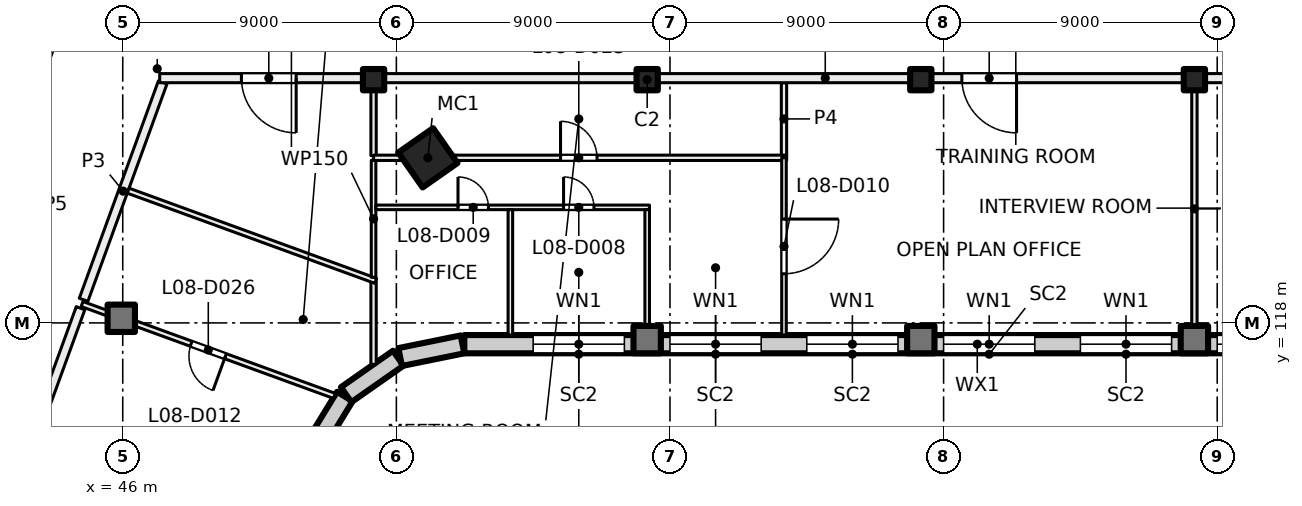
"""IFC4 building model, lengths in metres.
Left out: names, types, materials, properties, quantities, classifications, styles, units other than length and angle.
Written with IfcOpenShell. Run it as: python <this file> out.ifc"""

import sys

from ifc_helpers import new_model, si_unit, direction, frame, frame_2d, origin, origin_2d, place, context, subcontext, project, spatial, rectangle, hollow_rectangle, extrude, element, fill, save


model = new_model("IFC4")
c1 = context("Model", 3, precision=1e-05, world=origin(), true_north=direction((0.0, 1.0)))
c2 = subcontext(c1, "Body", "Model", "MODEL_VIEW")
j1 = project(units=[si_unit("LENGTHUNIT", "METRE"), si_unit("PLANEANGLEUNIT", "RADIAN")], contexts=[c1])
p1 = place(None, origin())
s1 = spatial("IfcSite", under=j1, at=p1, CompositionType="ELEMENT")
p2 = place(p1, origin())
s2 = spatial("IfcBuilding", under=s1, at=p2, CompositionType="ELEMENT")
p3 = place(p2, frame((0.0, 0.0, 39.5)))
s3 = spatial("IfcBuildingStorey", under=s2, at=p3, CompositionType="ELEMENT", Elevation=39.5)
p4 = place(p3, frame((56.036, 123.43, 0.0), z_axis=(0.0, 0.0, 1.0), x_axis=(0.573576436351, -0.819152044289, 0.0)))
e1 = element("IfcColumn", 1, at=p4, inside=s3, PredefinedType="COLUMN", context=c2, shape_type="SweptSolid", body=[
    extrude(hollow_rectangle(XDim=1.4, YDim=1.4, WallThickness=0.04, at=origin_2d()), origin(), (0.0, 0.0, 1.0), 4.0),
])
for number, where, z_axis, x_axis in (
    (2, (54.25, 126.0, 0.0), (0.0, 0.0, 1.0), (1.0, 0.0, 0.0)),
    (3, (63.25, 126.0, 0.0), (0.0, 0.0, 1.0), (1.0, 0.0, 0.0)),
    (4, (72.25, 126.0, 0.0), (0.0, 0.0, 1.0), (1.0, 0.0, 0.0)),
    (5, (81.25, 126.0, 0.0), (0.0, 0.0, 1.0), (1.0, 0.0, 0.0)),
):
    element("IfcColumn", number, at=place(p3, frame(where, z_axis=z_axis, x_axis=x_axis)), inside=s3, PredefinedType="COLUMN", context=c2, shape_type="SweptSolid", body=[
        extrude(rectangle(XDim=0.7, YDim=0.7, at=origin_2d()), origin(), (0.0, 0.0, 1.0), 4.0),
    ])
for number, where, z_axis, x_axis in (
    (6, (45.952, 118.152, 0.0), (0.0, 0.0, 1.0), (1.0, 0.0, 0.0)),
    (7, (63.25, 117.45, 0.0), (0.0, 0.0, 1.0), (1.0, 0.0, 0.0)),
    (8, (72.25, 117.45, 0.0), (0.0, 0.0, 1.0), (1.0, 0.0, 0.0)),
    (9, (81.25, 117.45, 0.0), (0.0, 0.0, 1.0), (1.0, 0.0, 0.0)),
):
    element("IfcColumn", number, at=place(p3, frame(where, z_axis=z_axis, x_axis=x_axis)), inside=s3, PredefinedType="COLUMN", context=c2, shape_type="SweptSolid", body=[
        extrude(rectangle(XDim=0.9, YDim=0.9, at=origin_2d()), origin(), (0.0, 0.0, 1.0), 4.0),
    ])
p5 = place(p3, frame((53.305, 115.578, 0.0), z_axis=(0.0, 0.0, 1.0), x_axis=(-0.522402266438, -0.852699168535, 0.0)))
e10 = element("IfcWall", 10, at=p5, inside=s3, PredefinedType="SOLIDWALL", context=c2, shape_type="SweptSolid", body=[
    extrude(rectangle(XDim=2.042, YDim=0.6, at=frame_2d((1.021, 0.0))), origin(), (0.0, 0.0, 1.0), 3.625),
])
for number, where, z_axis, x_axis in (
    (11, (55.062, 116.839, 0.0), (0.0, 0.0, 1.0), (-0.819, -0.574, 0.0)),
    (12, (57.175, 117.294, 0.0), (0.0, 0.0, 1.0), (-0.98, -0.199, 0.0)),
):
    element("IfcWall", number, at=place(p3, frame(where, z_axis=z_axis, x_axis=x_axis)), inside=s3, PredefinedType="SOLIDWALL", context=c2, shape_type="SweptSolid", body=[
        extrude(rectangle(XDim=2.092, YDim=0.6, at=frame_2d((1.046, 0.0))), origin(), (0.0, 0.0, 1.0), 3.625),
    ])
p6 = place(p3, frame((90.98, 117.3, 0.0), z_axis=(0.0, 0.0, 1.0), x_axis=(-1.0, 0.0, 0.0)))
e13 = element("IfcWall", 13, at=p6, inside=s3, PredefinedType="SOLIDWALL", context=c2, shape_type="SweptSolid", body=[
    extrude(rectangle(XDim=33.745, YDim=0.6, at=frame_2d((16.873, 0.0))), origin(), (0.0, 0.0, 1.0), 3.625),
])
p7 = place(p6, frame((1.48, 0.0, 0.9)))
e14 = element("IfcOpeningElement", 14, at=p7, cuts=e13, PredefinedType="OPENING", context=c2, shape_type="SweptSolid", body=[
    extrude(rectangle(XDim=3.0, YDim=2.4, at=frame_2d((1.5, 1.2))), frame((0.0, 0.31, 0.0), z_axis=(0.0, -1.0, 0.0), x_axis=(1.0, 0.0, 0.0)), (0.0, 0.0, 1.0), 0.62),
])
p8 = place(p6, frame((5.98, 0.0, 0.9)))
e15 = element("IfcOpeningElement", 15, at=p8, cuts=e13, PredefinedType="OPENING", context=c2, shape_type="SweptSolid", body=[
    extrude(rectangle(XDim=3.0, YDim=2.4, at=frame_2d((1.5, 1.2))), frame((0.0, 0.31, 0.0), z_axis=(0.0, -1.0, 0.0), x_axis=(1.0, 0.0, 0.0)), (0.0, 0.0, 1.0), 0.62),
])
p9 = place(p6, frame((10.48, 0.0, 0.9)))
e16 = element("IfcOpeningElement", 16, at=p9, cuts=e13, PredefinedType="OPENING", context=c2, shape_type="SweptSolid", body=[
    extrude(rectangle(XDim=3.0, YDim=2.4, at=frame_2d((1.5, 1.2))), frame((0.0, 0.31, 0.0), z_axis=(0.0, -1.0, 0.0), x_axis=(1.0, 0.0, 0.0)), (0.0, 0.0, 1.0), 0.62),
])
p10 = place(p6, frame((14.98, 0.0, 0.9)))
e17 = element("IfcOpeningElement", 17, at=p10, cuts=e13, PredefinedType="OPENING", context=c2, shape_type="SweptSolid", body=[
    extrude(rectangle(XDim=3.0, YDim=2.4, at=frame_2d((1.5, 1.2))), frame((0.0, 0.31, 0.0), z_axis=(0.0, -1.0, 0.0), x_axis=(1.0, 0.0, 0.0)), (0.0, 0.0, 1.0), 0.62),
])
p11 = place(p6, frame((19.48, 0.0, 0.9)))
e18 = element("IfcOpeningElement", 18, at=p11, cuts=e13, PredefinedType="OPENING", context=c2, shape_type="SweptSolid", body=[
    extrude(rectangle(XDim=3.0, YDim=2.4, at=frame_2d((1.5, 1.2))), frame((0.0, 0.31, 0.0), z_axis=(0.0, -1.0, 0.0), x_axis=(1.0, 0.0, 0.0)), (0.0, 0.0, 1.0), 0.62),
])
p12 = place(p6, frame((23.98, 0.0, 0.9)))
e19 = element("IfcOpeningElement", 19, at=p12, cuts=e13, PredefinedType="OPENING", context=c2, shape_type="SweptSolid", body=[
    extrude(rectangle(XDim=3.0, YDim=2.4, at=frame_2d((1.5, 1.2))), frame((0.0, 0.31, 0.0), z_axis=(0.0, -1.0, 0.0), x_axis=(1.0, 0.0, 0.0)), (0.0, 0.0, 1.0), 0.62),
])
p13 = place(p6, frame((28.48, 0.0, 0.9)))
e20 = element("IfcOpeningElement", 20, at=p13, cuts=e13, PredefinedType="OPENING", context=c2, shape_type="SweptSolid", body=[
    extrude(rectangle(XDim=3.0, YDim=2.4, at=frame_2d((1.5, 1.2))), frame((0.0, 0.31, 0.0), z_axis=(0.0, -1.0, 0.0), x_axis=(1.0, 0.0, 0.0)), (0.0, 0.0, 1.0), 0.62),
])
p14 = place(p3, frame((32.881, 97.657, 0.0), z_axis=(0.0, 0.0, 1.0), x_axis=(0.342017360004, 0.939693633828, 0.0)))
e21 = element("IfcWall", 21, at=p14, inside=s3, PredefinedType="PARTITIONING", context=c2, shape_type="SweptSolid", body=[
    extrude(rectangle(XDim=34.516, YDim=0.3, at=frame_2d((17.258, 0.0))), origin(), (0.0, 0.0, 1.0), 3.625),
])
p15 = place(p14, frame((4.275, 0.0, 0.0)))
e22 = element("IfcOpeningElement", 22, at=p15, cuts=e21, PredefinedType="OPENING", context=c2, shape_type="SweptSolid", body=[
    extrude(rectangle(XDim=1.2, YDim=2.1, at=frame_2d((0.6, 1.05))), frame((0.0, 0.16, 0.0), z_axis=(0.0, -1.0, 0.0), x_axis=(1.0, 0.0, 0.0)), (0.0, 0.0, 1.0), 0.32),
])
p16 = place(p14, frame((16.0, 0.0, 0.0)))
e23 = element("IfcOpeningElement", 23, at=p16, cuts=e21, PredefinedType="OPENING", context=c2, shape_type="SweptSolid", body=[
    extrude(rectangle(XDim=1.0, YDim=2.1, at=frame_2d((0.5, 1.05))), frame((0.0, 0.16, 0.0), z_axis=(0.0, -1.0, 0.0), x_axis=(1.0, 0.0, 0.0)), (0.0, 0.0, 1.0), 0.32),
])
p17 = place(p14, frame((21.5, 0.0, 0.0)))
e24 = element("IfcOpeningElement", 24, at=p17, cuts=e21, PredefinedType="OPENING", context=c2, shape_type="SweptSolid", body=[
    extrude(rectangle(XDim=1.0, YDim=2.1, at=frame_2d((0.5, 1.05))), frame((0.0, 0.16, 0.0), z_axis=(0.0, -1.0, 0.0), x_axis=(1.0, 0.0, 0.0)), (0.0, 0.0, 1.0), 0.32),
])
p18 = place(p3, frame((52.965, 115.598, 0.0), z_axis=(0.0, 0.0, 1.0), x_axis=(-0.939650555598, 0.342135694374, 0.0)))
e25 = element("IfcWall", 25, at=p18, inside=s3, PredefinedType="PARTITIONING", context=c2, shape_type="SweptSolid", body=[
    extrude(rectangle(XDim=8.836, YDim=0.175, at=frame_2d((4.418, 0.0))), origin(), (0.0, 0.0, 1.0), 3.625),
])
p19 = place(p18, frame((3.818, 0.0, 0.0)))
e26 = element("IfcOpeningElement", 26, at=p19, cuts=e25, PredefinedType="OPENING", context=c2, shape_type="SweptSolid", body=[
    extrude(rectangle(XDim=1.2, YDim=2.1, at=frame_2d((0.6, 1.05))), frame((0.0, 0.097, 0.0), z_axis=(0.0, -1.0, 0.0), x_axis=(1.0, 0.0, 0.0)), (0.0, 0.0, 1.0), 0.195),
])
p20 = place(p3, frame((44.612, 118.483, 0.0), z_axis=(0.0, 0.0, 1.0), x_axis=(-0.342043123066, -0.939684256526, 0.0)))
e27 = element("IfcWall", 27, at=p20, inside=s3, PredefinedType="PARTITIONING", context=c2, shape_type="SweptSolid", body=[
    extrude(rectangle(XDim=23.582, YDim=0.3, at=frame_2d((11.791, 0.0))), origin(), (0.0, 0.0, 1.0), 3.625),
])
p21 = place(p20, frame((14.932, 0.0, 0.0)))
e28 = element("IfcOpeningElement", 28, at=p21, cuts=e27, PredefinedType="OPENING", context=c2, shape_type="SweptSolid", body=[
    extrude(rectangle(XDim=0.8, YDim=2.1, at=frame_2d((0.4, 1.05))), frame((0.0, 0.16, 0.0), z_axis=(0.0, -1.0, 0.0), x_axis=(1.0, 0.0, 0.0)), (0.0, 0.0, 1.0), 0.32),
])
p22 = place(p20, frame((10.982, 0.0, 0.0)))
e29 = element("IfcOpeningElement", 29, at=p22, cuts=e27, PredefinedType="OPENING", context=c2, shape_type="SweptSolid", body=[
    extrude(rectangle(XDim=1.2, YDim=2.1, at=frame_2d((0.6, 1.05))), frame((0.0, 0.16, 0.0), z_axis=(0.0, -1.0, 0.0), x_axis=(1.0, 0.0, 0.0)), (0.0, 0.0, 1.0), 0.32),
])
p23 = place(p20, frame((19.307, 0.0, 0.0)))
e30 = element("IfcOpeningElement", 30, at=p23, cuts=e27, PredefinedType="OPENING", context=c2, shape_type="SweptSolid", body=[
    extrude(rectangle(XDim=1.8, YDim=2.1, at=frame_2d((0.9, 1.05))), frame((0.0, 0.16, 0.0), z_axis=(0.0, -1.0, 0.0), x_axis=(1.0, 0.0, 0.0)), (0.0, 0.0, 1.0), 0.32),
])
p24 = place(p20, frame((5.756, 0.0, 0.0)))
e31 = element("IfcOpeningElement", 31, at=p24, cuts=e27, PredefinedType="OPENING", context=c2, shape_type="SweptSolid", body=[
    extrude(rectangle(XDim=1.8, YDim=2.1, at=frame_2d((0.9, 1.05))), frame((0.0, 0.16, 0.0), z_axis=(0.0, -1.0, 0.0), x_axis=(1.0, 0.0, 0.0)), (0.0, 0.0, 1.0), 0.32),
])
p25 = place(p3, frame((47.314, 125.909, 0.0), z_axis=(0.0, 0.0, 1.0), x_axis=(-0.34198522802, -0.939705328183, 0.0)))
e32 = element("IfcWall", 32, at=p25, inside=s3, PredefinedType="PARTITIONING", context=c2, shape_type="SweptSolid", body=[
    extrude(rectangle(XDim=7.609, YDim=0.3, at=frame_2d((3.804, 0.0))), origin(), (0.0, 0.0, 1.0), 3.625),
])
p26 = place(p3, frame((54.25, 116.637, 0.0), z_axis=(0.0, 0.0, 1.0), x_axis=(0.0, 1.0, 0.0)))
e33 = element("IfcWall", 33, at=p26, inside=s3, PredefinedType="PARTITIONING", context=c2, shape_type="SweptSolid", body=[
    extrude(rectangle(XDim=2.776, YDim=0.175, at=frame_2d((1.388, 0.0))), origin(), (0.0, 0.0, 1.0), 3.625),
])
p27 = place(p3, frame((54.32, 119.384, 0.0), z_axis=(0.0, 0.0, 1.0), x_axis=(-0.939632908118, 0.342184157994, 0.0)))
e34 = element("IfcWall", 34, at=p27, inside=s3, PredefinedType="PARTITIONING", context=c2, shape_type="SweptSolid", body=[
    extrude(rectangle(XDim=8.665, YDim=0.175, at=frame_2d((4.333, 0.0))), origin(), (0.0, 0.0, 1.0), 3.625),
])
p28 = place(p3, frame((54.25, 119.498, 0.0), z_axis=(0.0, 0.0, 1.0), x_axis=(0.0, 1.0, 0.0)))
e35 = element("IfcWall", 35, at=p28, inside=s3, PredefinedType="PARTITIONING", context=c2, shape_type="SweptSolid", body=[
    extrude(rectangle(XDim=3.848, YDim=0.15, at=frame_2d((1.924, 0.0))), origin(), (0.0, 0.0, 1.0), 3.625),
])
p29 = place(p3, frame((54.325, 121.8, 0.0), z_axis=(0.0, 0.0, 1.0), x_axis=(1.0, 0.0, 0.0)))
e36 = element("IfcWall", 36, at=p29, inside=s3, PredefinedType="PARTITIONING", context=c2, shape_type="SweptSolid", body=[
    extrude(rectangle(XDim=9.0, YDim=0.15, at=frame_2d((4.5, 0.0))), origin(), (0.0, 0.0, 1.0), 3.625),
])
p30 = place(p29, frame((6.175, 0.0, 0.0)))
e37 = element("IfcOpeningElement", 37, at=p30, cuts=e36, PredefinedType="OPENING", context=c2, shape_type="SweptSolid", body=[
    extrude(rectangle(XDim=1.0, YDim=2.1, at=frame_2d((0.5, 1.05))), frame((0.0, 0.085, 0.0), z_axis=(0.0, -1.0, 0.0), x_axis=(1.0, 0.0, 0.0)), (0.0, 0.0, 1.0), 0.17),
])
p31 = place(p29, frame((2.702, 0.0, 0.0)))
e38 = element("IfcOpeningElement", 38, at=p31, cuts=e36, PredefinedType="OPENING", context=c2, shape_type="SweptSolid", body=[
    extrude(rectangle(XDim=1.0, YDim=2.1, at=frame_2d((0.5, 1.05))), frame((0.0, 0.085, 0.0), z_axis=(0.0, -1.0, 0.0), x_axis=(1.0, 0.0, 0.0)), (0.0, 0.0, 1.0), 0.17),
])
p32 = place(p3, frame((54.25, 123.502, 0.0), z_axis=(0.0, 0.0, 1.0), x_axis=(0.0, 1.0, 0.0)))
e39 = element("IfcWall", 39, at=p32, inside=s3, PredefinedType="PARTITIONING", context=c2, shape_type="SweptSolid", body=[
    extrude(rectangle(XDim=2.398, YDim=0.175, at=frame_2d((1.199, 0.0))), origin(), (0.0, 0.0, 1.0), 3.625),
])
p33 = place(p3, frame((54.25, 123.43, 0.0), z_axis=(0.0, 0.0, 1.0), x_axis=(1.0, 0.0, 0.0)))
e40 = element("IfcWall", 40, at=p33, inside=s3, PredefinedType="PARTITIONING", context=c2, shape_type="SweptSolid", body=[
    extrude(rectangle(XDim=13.588, YDim=0.175, at=frame_2d((6.794, 0.0))), origin(), (0.0, 0.0, 1.0), 3.625),
])
p34 = place(p33, frame((6.15, 0.0, 0.0)))
e41 = element("IfcOpeningElement", 41, at=p34, cuts=e40, PredefinedType="OPENING", context=c2, shape_type="SweptSolid", body=[
    extrude(rectangle(XDim=1.2, YDim=2.1, at=frame_2d((0.6, 1.05))), frame((0.0, 0.097, 0.0), z_axis=(0.0, -1.0, 0.0), x_axis=(1.0, 0.0, 0.0)), (0.0, 0.0, 1.0), 0.195),
])
for number, where, z_axis, x_axis in (
    (42, (58.75, 117.6, 0.0), (0.0, 0.0, 1.0), (0.0, 1.0, 0.0)),
    (43, (63.25, 117.6, 0.0), (0.0, 0.0, 1.0), (0.0, 1.0, 0.0)),
):
    element("IfcWall", number, at=place(p3, frame(where, z_axis=z_axis, x_axis=x_axis)), inside=s3, PredefinedType="PARTITIONING", context=c2, shape_type="SweptSolid", body=[
        extrude(rectangle(XDim=4.125, YDim=0.15, at=frame_2d((2.062, 0.0))), origin(), (0.0, 0.0, 1.0), 3.625),
    ])
p35 = place(p3, frame((67.75, 123.433, 0.0), z_axis=(0.0, 0.0, 1.0), x_axis=(0.0, -1.0, 0.0)))
e44 = element("IfcWall", 44, at=p35, inside=s3, PredefinedType="PARTITIONING", context=c2, shape_type="SweptSolid", body=[
    extrude(rectangle(XDim=5.833, YDim=0.15, at=frame_2d((2.917, 0.0))), origin(), (0.0, 0.0, 1.0), 3.625),
])
p36 = place(p35, frame((2.018, 0.0, 0.0)))
e45 = element("IfcOpeningElement", 45, at=p36, cuts=e44, PredefinedType="OPENING", context=c2, shape_type="SweptSolid", body=[
    extrude(rectangle(XDim=1.8, YDim=2.1, at=frame_2d((0.9, 1.05))), frame((0.0, 0.085, 0.0), z_axis=(0.0, -1.0, 0.0), x_axis=(1.0, 0.0, 0.0)), (0.0, 0.0, 1.0), 0.17),
])
p37 = place(p3, frame((67.75, 123.518, 0.0), z_axis=(0.0, 0.0, 1.0), x_axis=(0.0, 1.0, 0.0)))
e46 = element("IfcWall", 46, at=p37, inside=s3, PredefinedType="PARTITIONING", context=c2, shape_type="SweptSolid", body=[
    extrude(rectangle(XDim=2.382, YDim=0.175, at=frame_2d((1.191, 0.0))), origin(), (0.0, 0.0, 1.0), 3.625),
])
p38 = place(p3, frame((81.25, 117.6, 0.0), z_axis=(0.0, 0.0, 1.0), x_axis=(0.0, 1.0, 0.0)))
e47 = element("IfcWall", 47, at=p38, inside=s3, PredefinedType="PARTITIONING", context=c2, shape_type="SweptSolid", body=[
    extrude(rectangle(XDim=8.3, YDim=0.175, at=frame_2d((4.15, 0.0))), origin(), (0.0, 0.0, 1.0), 3.625),
])
p39 = place(p3, frame((91.0, 126.05, 0.0), z_axis=(0.0, 0.0, 1.0), x_axis=(-1.0, 0.0, 0.0)))
e48 = element("IfcWall", 48, at=p39, inside=s3, PredefinedType="PARTITIONING", context=c2, shape_type="SweptSolid", body=[
    extrude(rectangle(XDim=43.785, YDim=0.3, at=frame_2d((21.893, 0.0))), origin(), (0.0, 0.0, 1.0), 3.625),
])
p40 = place(p39, frame((2.025, 0.0, 0.0)))
e49 = element("IfcOpeningElement", 49, at=p40, cuts=e48, PredefinedType="OPENING", context=c2, shape_type="SweptSolid", body=[
    extrude(rectangle(XDim=1.2, YDim=2.1, at=frame_2d((0.6, 1.05))), frame((0.0, 0.16, 0.0), z_axis=(0.0, -1.0, 0.0), x_axis=(1.0, 0.0, 0.0)), (0.0, 0.0, 1.0), 0.32),
])
p41 = place(p39, frame((6.9, 0.0, 0.0)))
e50 = element("IfcOpeningElement", 50, at=p41, cuts=e48, PredefinedType="OPENING", context=c2, shape_type="SweptSolid", body=[
    extrude(rectangle(XDim=1.2, YDim=2.1, at=frame_2d((0.6, 1.05))), frame((0.0, 0.16, 0.0), z_axis=(0.0, -1.0, 0.0), x_axis=(1.0, 0.0, 0.0)), (0.0, 0.0, 1.0), 0.32),
])
p42 = place(p39, frame((15.6, 0.0, 0.0)))
e51 = element("IfcOpeningElement", 51, at=p42, cuts=e48, PredefinedType="OPENING", context=c2, shape_type="SweptSolid", body=[
    extrude(rectangle(XDim=1.8, YDim=2.1, at=frame_2d((0.9, 1.05))), frame((0.0, 0.16, 0.0), z_axis=(0.0, -1.0, 0.0), x_axis=(1.0, 0.0, 0.0)), (0.0, 0.0, 1.0), 0.32),
])
p43 = place(p39, frame((39.296, 0.0, 0.0)))
e52 = element("IfcOpeningElement", 52, at=p43, cuts=e48, PredefinedType="OPENING", context=c2, shape_type="SweptSolid", body=[
    extrude(rectangle(XDim=1.8, YDim=2.1, at=frame_2d((0.9, 1.05))), frame((0.0, 0.16, 0.0), z_axis=(0.0, -1.0, 0.0), x_axis=(1.0, 0.0, 0.0)), (0.0, 0.0, 1.0), 0.32),
])
p44 = place(p8, origin())
e53 = element("IfcWindow", 53, at=p44, inside=s3, PartitioningType="SINGLE_PANEL", PredefinedType="WINDOW", context=c2, shape_type="SweptSolid", body=[
    extrude(rectangle(XDim=3.0, YDim=2.4, at=frame_2d((1.5, 1.2))), frame((0.0, 0.03, 0.0), z_axis=(0.0, -1.0, 0.0), x_axis=(1.0, 0.0, 0.0)), (0.0, 0.0, 1.0), 0.06),
])
fill(e15, e53)
p45 = place(p9, origin())
e54 = element("IfcWindow", 54, at=p45, inside=s3, PartitioningType="SINGLE_PANEL", PredefinedType="WINDOW", context=c2, shape_type="SweptSolid", body=[
    extrude(rectangle(XDim=3.0, YDim=2.4, at=frame_2d((1.5, 1.2))), frame((0.0, 0.03, 0.0), z_axis=(0.0, -1.0, 0.0), x_axis=(1.0, 0.0, 0.0)), (0.0, 0.0, 1.0), 0.06),
])
fill(e16, e54)
p46 = place(p10, origin())
e55 = element("IfcWindow", 55, at=p46, inside=s3, PartitioningType="SINGLE_PANEL", PredefinedType="WINDOW", context=c2, shape_type="SweptSolid", body=[
    extrude(rectangle(XDim=3.0, YDim=2.4, at=frame_2d((1.5, 1.2))), frame((0.0, 0.03, 0.0), z_axis=(0.0, -1.0, 0.0), x_axis=(1.0, 0.0, 0.0)), (0.0, 0.0, 1.0), 0.06),
])
fill(e17, e55)
p47 = place(p11, origin())
e56 = element("IfcWindow", 56, at=p47, inside=s3, PartitioningType="SINGLE_PANEL", PredefinedType="WINDOW", context=c2, shape_type="SweptSolid", body=[
    extrude(rectangle(XDim=3.0, YDim=2.4, at=frame_2d((1.5, 1.2))), frame((0.0, 0.03, 0.0), z_axis=(0.0, -1.0, 0.0), x_axis=(1.0, 0.0, 0.0)), (0.0, 0.0, 1.0), 0.06),
])
fill(e18, e56)
p48 = place(p12, origin())
e57 = element("IfcWindow", 57, at=p48, inside=s3, PartitioningType="SINGLE_PANEL", PredefinedType="WINDOW", context=c2, shape_type="SweptSolid", body=[
    extrude(rectangle(XDim=3.0, YDim=2.4, at=frame_2d((1.5, 1.2))), frame((0.0, 0.03, 0.0), z_axis=(0.0, -1.0, 0.0), x_axis=(1.0, 0.0, 0.0)), (0.0, 0.0, 1.0), 0.06),
])
fill(e19, e57)
p49 = place(p13, origin())
e58 = element("IfcWindow", 58, at=p49, inside=s3, PartitioningType="SINGLE_PANEL", PredefinedType="WINDOW", context=c2, shape_type="SweptSolid", body=[
    extrude(rectangle(XDim=3.0, YDim=2.4, at=frame_2d((1.5, 1.2))), frame((0.0, 0.03, 0.0), z_axis=(0.0, -1.0, 0.0), x_axis=(1.0, 0.0, 0.0)), (0.0, 0.0, 1.0), 0.06),
])
fill(e20, e58)
p50 = place(p42, origin())
e59 = element("IfcDoor", 59, at=p50, inside=s3, OperationType="DOUBLE_DOOR_SINGLE_SWING", PredefinedType="DOOR", context=c2, shape_type="SweptSolid", body=[
    extrude(rectangle(XDim=1.8, YDim=2.1, at=frame_2d((0.9, 1.05))), frame((0.0, 0.025, 0.0), z_axis=(0.0, -1.0, 0.0), x_axis=(1.0, 0.0, 0.0)), (0.0, 0.0, 1.0), 0.05),
])
fill(e51, e59)
p51 = place(p30, origin())
e60 = element("IfcDoor", 60, at=p51, inside=s3, OperationType="SINGLE_SWING_RIGHT", PredefinedType="DOOR", context=c2, shape_type="SweptSolid", body=[
    extrude(rectangle(XDim=1.0, YDim=2.1, at=frame_2d((0.5, 1.05))), frame((0.0, 0.025, 0.0), z_axis=(0.0, -1.0, 0.0), x_axis=(1.0, 0.0, 0.0)), (0.0, 0.0, 1.0), 0.05),
])
fill(e37, e60)
p52 = place(p31, origin())
e61 = element("IfcDoor", 61, at=p52, inside=s3, OperationType="SINGLE_SWING_RIGHT", PredefinedType="DOOR", context=c2, shape_type="SweptSolid", body=[
    extrude(rectangle(XDim=1.0, YDim=2.1, at=frame_2d((0.5, 1.05))), frame((0.0, 0.025, 0.0), z_axis=(0.0, -1.0, 0.0), x_axis=(1.0, 0.0, 0.0)), (0.0, 0.0, 1.0), 0.05),
])
fill(e38, e61)
p53 = place(p36, origin())
e62 = element("IfcDoor", 62, at=p53, inside=s3, OperationType="DOUBLE_DOOR_SINGLE_SWING", PredefinedType="DOOR", context=c2, shape_type="SweptSolid", body=[
    extrude(rectangle(XDim=1.8, YDim=2.1, at=frame_2d((0.9, 1.05))), frame((0.0, 0.025, 0.0), z_axis=(0.0, -1.0, 0.0), x_axis=(1.0, 0.0, 0.0)), (0.0, 0.0, 1.0), 0.05),
])
fill(e45, e62)
p54 = place(p43, origin())
e63 = element("IfcDoor", 63, at=p54, inside=s3, OperationType="DOUBLE_DOOR_SINGLE_SWING", PredefinedType="DOOR", context=c2, shape_type="SweptSolid", body=[
    extrude(rectangle(XDim=1.8, YDim=2.1, at=frame_2d((0.9, 1.05))), frame((0.0, 0.025, 0.0), z_axis=(0.0, -1.0, 0.0), x_axis=(1.0, 0.0, 0.0)), (0.0, 0.0, 1.0), 0.05),
])
fill(e52, e63)
p55 = place(p34, origin())
e64 = element("IfcDoor", 64, at=p55, inside=s3, OperationType="DOUBLE_DOOR_SINGLE_SWING", PredefinedType="DOOR", context=c2, shape_type="SweptSolid", body=[
    extrude(rectangle(XDim=1.2, YDim=2.1, at=frame_2d((0.6, 1.05))), frame((0.0, 0.025, 0.0), z_axis=(0.0, -1.0, 0.0), x_axis=(1.0, 0.0, 0.0)), (0.0, 0.0, 1.0), 0.05),
])
fill(e41, e64)
p56 = place(p19, origin())
e65 = element("IfcDoor", 65, at=p56, inside=s3, OperationType="DOUBLE_DOOR_SINGLE_SWING", PredefinedType="DOOR", context=c2, shape_type="SweptSolid", body=[
    extrude(rectangle(XDim=1.2, YDim=2.1, at=frame_2d((0.6, 1.05))), frame((0.0, 0.025, 0.0), z_axis=(0.0, -1.0, 0.0), x_axis=(1.0, 0.0, 0.0)), (0.0, 0.0, 1.0), 0.05),
])
fill(e26, e65)
save(model, sys.argv[1])
